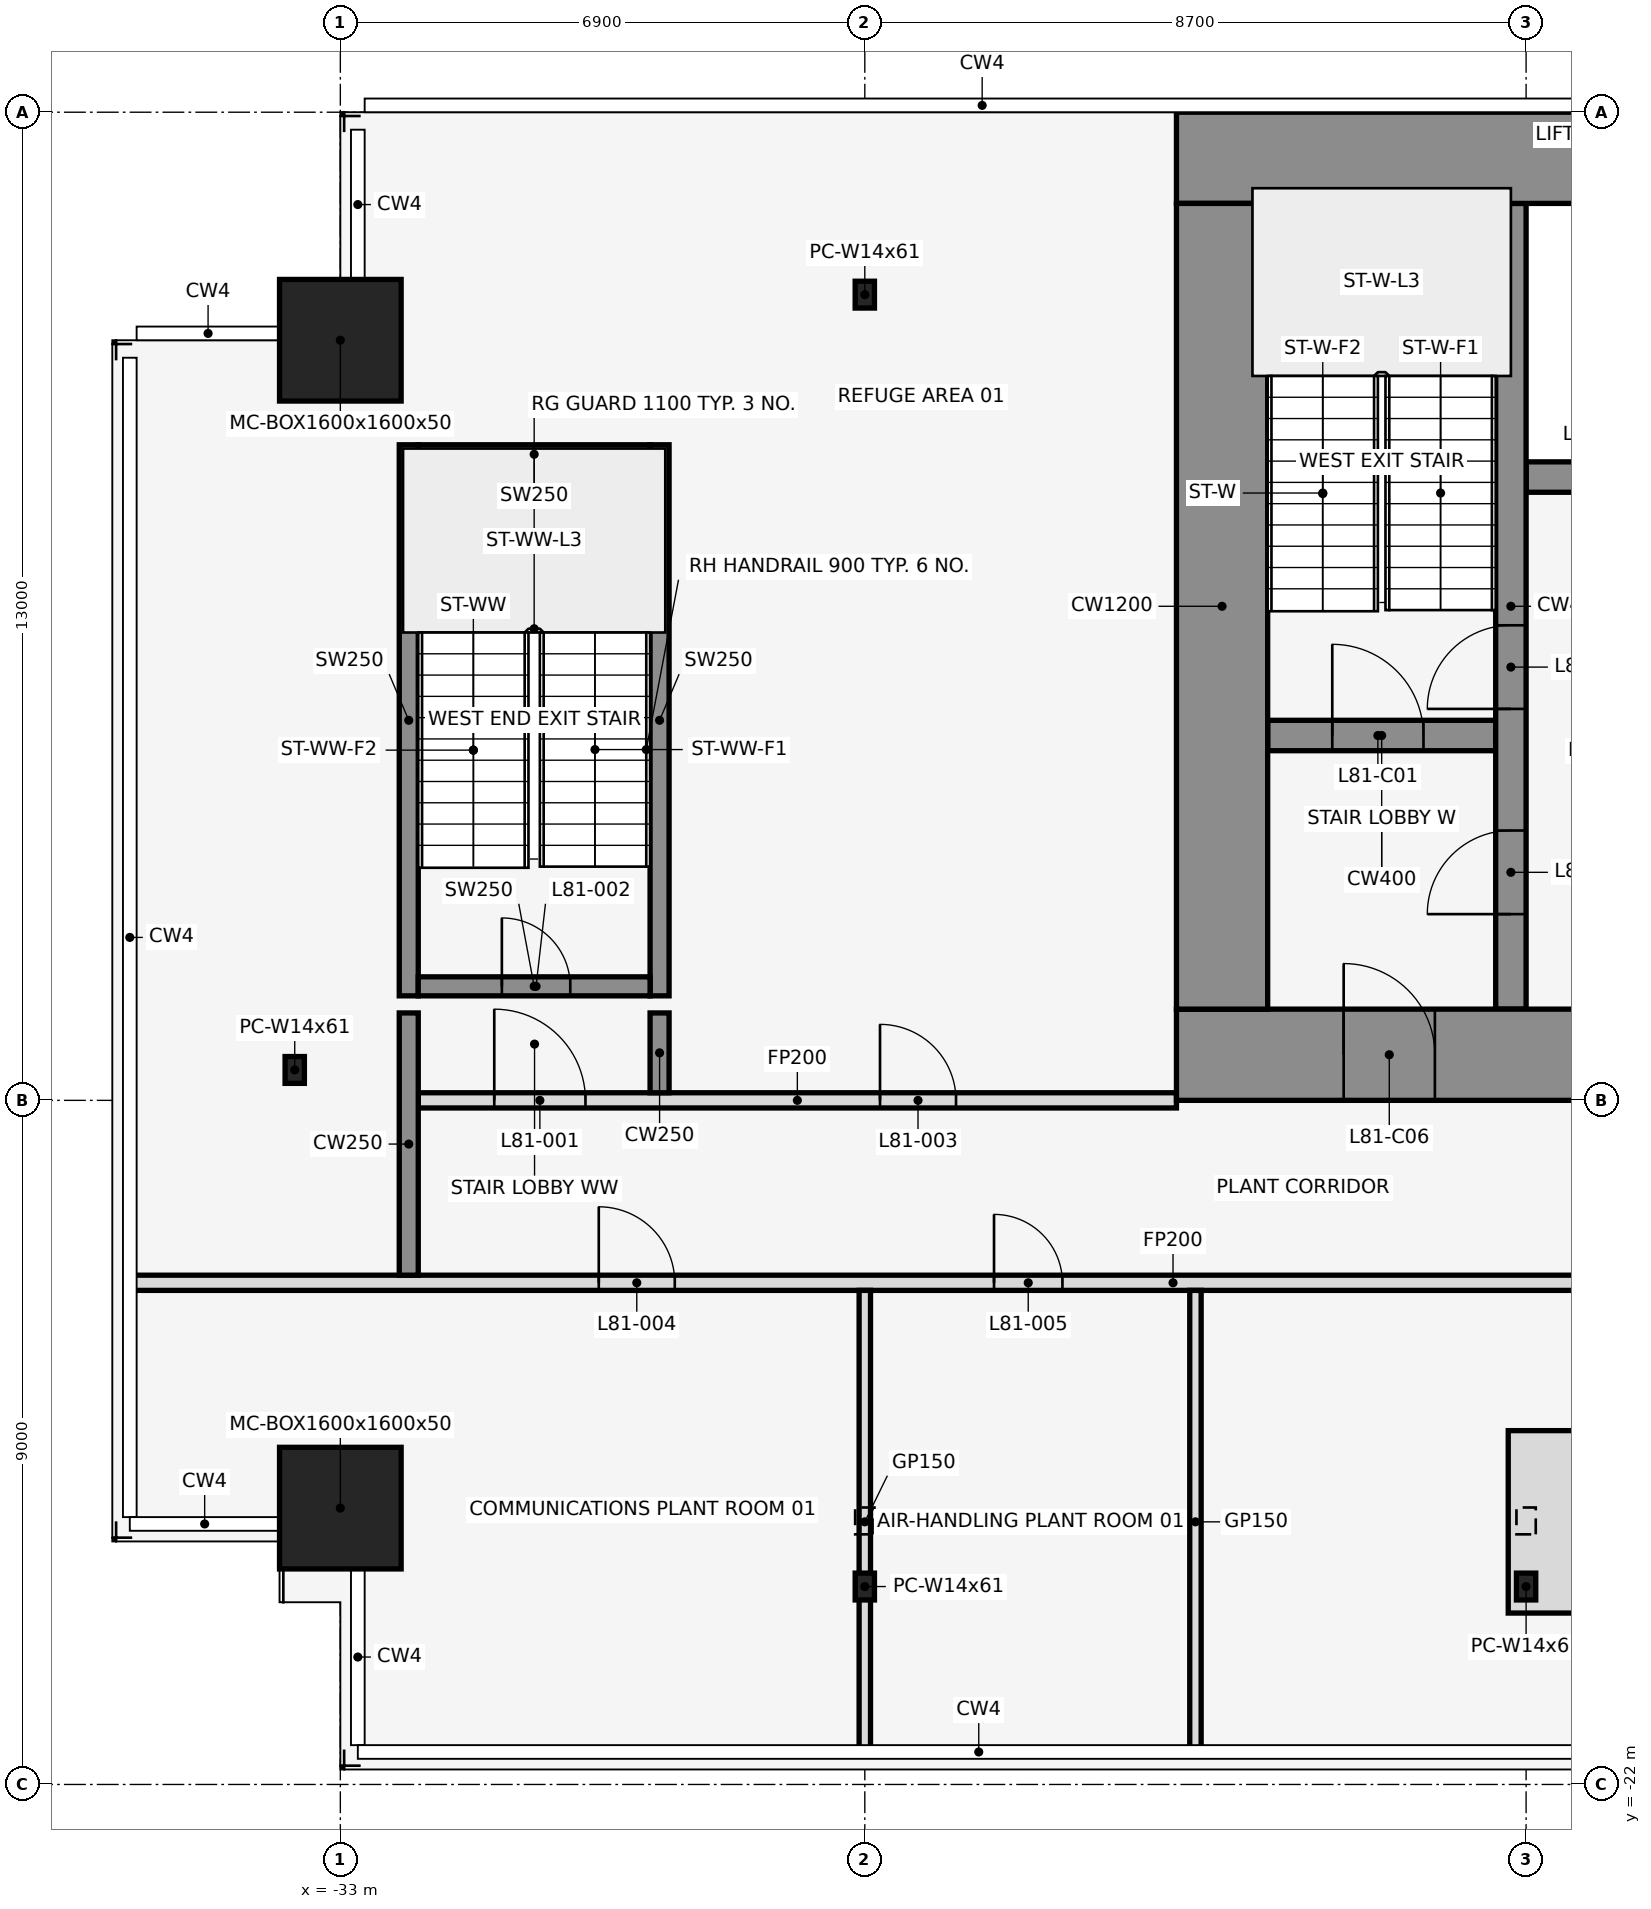
"""IFC4 building model, lengths in metres.
Left out: names, types, materials, properties, quantities, classifications, styles, units other than length and angle.
Written with IfcOpenShell. Run it as: python <this file> out.ifc"""

import sys

from ifc_helpers import new_model, si_unit, direction, frame, frame_2d, origin, origin_2d, place, context, subcontext, project, spatial, rectangle, hollow_rectangle, i_section, extrude, element, fill, save


model = new_model("IFC4")
c1 = context("Model", 3, precision=1e-05, world=origin(), true_north=direction((0.0, 1.0)))
c2 = subcontext(c1, "Body", "Model", "MODEL_VIEW")
j1 = project(units=[si_unit("LENGTHUNIT", "METRE"), si_unit("PLANEANGLEUNIT", "RADIAN")], contexts=[c1])
p1 = place(None, origin())
s1 = spatial("IfcSite", under=j1, at=p1, CompositionType="ELEMENT")
p2 = place(p1, origin())
s2 = spatial("IfcBuilding", under=s1, at=p2, CompositionType="ELEMENT")
p3 = place(p2, frame((0.0, 0.0, 361.4)))
s3 = spatial("IfcBuildingStorey", under=s2, at=p3, CompositionType="ELEMENT", Elevation=361.4)
for number, where, z_axis, x_axis in (
    (1, (-33.0, -18.365, 0.0), (0.0, 0.0, 1.0), (1.0, 0.0, 0.0)),
    (2, (-33.0, -3.0, 0.0), (0.0, 0.0, 1.0), (1.0, 0.0, 0.0)),
):
    element("IfcColumn", number, at=place(p3, frame(where, z_axis=z_axis, x_axis=x_axis)), inside=s3, PredefinedType="COLUMN", context=c2, shape_type="SweptSolid", body=[
        extrude(hollow_rectangle(XDim=1.6, YDim=1.6, WallThickness=0.05, at=origin_2d()), origin(), (0.0, 0.0, 1.0), 4.5),
    ])
p4 = place(p3, frame((-26.1, -19.396, 0.034), z_axis=(0.0, 0.191206783257, 0.981549777666), x_axis=(-1.0, 0.0, 0.0)))
e3 = element("IfcColumn", 3, at=p4, inside=s3, PredefinedType="COLUMN", context=c2, shape_type="SweptSolid", body=[
    extrude(i_section(OverallWidth=0.254, OverallDepth=0.353, WebThickness=0.01, FlangeThickness=0.016, at=origin_2d()), origin(), (0.0, 0.0, 1.0), 4.516),
])
p5 = place(p3, frame((-26.1, -2.4, 0.0), z_axis=(0.0, 0.0, 1.0), x_axis=(1.0, 0.0, 0.0)))
e4 = element("IfcColumn", 4, at=p5, inside=s3, PredefinedType="COLUMN", context=c2, shape_type="SweptSolid", body=[
    extrude(i_section(OverallWidth=0.254, OverallDepth=0.353, WebThickness=0.01, FlangeThickness=0.016, at=origin_2d()), origin(), (0.0, 0.0, 1.0), 4.5),
])
p6 = place(p3, frame((-17.4, -19.396, 0.034), z_axis=(0.0, 0.191206783257, 0.981549777666), x_axis=(-1.0, 0.0, 0.0)))
e5 = element("IfcColumn", 5, at=p6, inside=s3, PredefinedType="COLUMN", context=c2, shape_type="SweptSolid", body=[
    extrude(i_section(OverallWidth=0.254, OverallDepth=0.353, WebThickness=0.01, FlangeThickness=0.016, at=origin_2d()), origin(), (0.0, 0.0, 1.0), 4.516),
])
p7 = place(p3, frame((-33.6, -12.6, 0.0), z_axis=(0.0, 0.0, 1.0), x_axis=(1.0, 0.0, 0.0)))
e6 = element("IfcColumn", 6, at=p7, inside=s3, PredefinedType="COLUMN", context=c2, shape_type="SweptSolid", body=[
    extrude(i_section(OverallWidth=0.254, OverallDepth=0.353, WebThickness=0.01, FlangeThickness=0.016, at=origin_2d()), origin(), (0.0, 0.0, 1.0), 4.5),
])
p8 = place(p3, frame((-15.185, -18.545, 0.0), z_axis=(0.0, 0.0, 1.0), x_axis=(1.0, 0.0, 0.0)))
e7 = element("IfcWall", 7, at=p8, inside=s3, PredefinedType="USERDEFINED", context=c2, shape_type="SweptSolid", body=[
    extrude(rectangle(XDim=4.9, YDim=2.4, at=origin_2d()), origin(), (0.0, 0.0, 1.0), 0.2),
])
for number, where, z_axis, x_axis in (
    (8, (-32.1, -11.625, 0.0), (0.0, 0.0, 1.0), (0.0, 1.0, 0.0)),
    (9, (-28.8, -11.625, 0.0), (0.0, 0.0, 1.0), (0.0, 1.0, 0.0)),
):
    element("IfcWall", number, at=place(p3, frame(where, z_axis=z_axis, x_axis=x_axis)), inside=s3, PredefinedType="SHEAR", context=c2, shape_type="SweptSolid", body=[
        extrude(rectangle(XDim=7.25, YDim=0.25, at=frame_2d((3.625, 0.0))), origin(), (0.0, 0.0, 1.0), 4.5),
    ])
p9 = place(p3, frame((-31.975, -11.5, 0.0), z_axis=(0.0, 0.0, 1.0), x_axis=(1.0, 0.0, 0.0)))
e10 = element("IfcWall", 10, at=p9, inside=s3, PredefinedType="SHEAR", context=c2, shape_type="SweptSolid", body=[
    extrude(rectangle(XDim=3.05, YDim=0.25, at=frame_2d((1.525, 0.0))), origin(), (0.0, 0.0, 1.0), 4.5),
])
p10 = place(p9, frame((1.1, 0.0, 0.0)))
e11 = element("IfcOpeningElement", 11, at=p10, cuts=e10, PredefinedType="OPENING", context=c2, shape_type="SweptSolid", body=[
    extrude(rectangle(XDim=0.9, YDim=2.1, at=frame_2d((0.45, 1.05))), frame((0.0, 0.137, 0.0), z_axis=(0.0, -1.0, 0.0), x_axis=(1.0, 0.0, 0.0)), (0.0, 0.0, 1.0), 0.274),
])
p11 = place(p3, frame((-31.975, -4.5, 0.0), z_axis=(0.0, 0.0, 1.0), x_axis=(1.0, 0.0, 0.0)))
e12 = element("IfcWall", 12, at=p11, inside=s3, PredefinedType="SHEAR", context=c2, shape_type="SweptSolid", body=[
    extrude(rectangle(XDim=3.05, YDim=0.25, at=frame_2d((1.525, 0.0))), origin(), (0.0, 0.0, 1.0), 4.5),
])
p12 = place(p3, frame((-35.79, -15.4, 0.0), z_axis=(0.0, 0.0, 1.0), x_axis=(1.0, 0.0, 0.0)))
e13 = element("IfcWall", 13, at=p12, inside=s3, PredefinedType="PARTITIONING", context=c2, shape_type="SweptSolid", body=[
    extrude(rectangle(XDim=27.49, YDim=0.2, at=frame_2d((13.745, 0.0))), origin(), (0.0, 0.0, 1.0), 3.368),
])
p13 = place(p12, frame((6.19, 0.0, 0.0)))
e14 = element("IfcOpeningElement", 14, at=p13, cuts=e13, PredefinedType="OPENING", context=c2, shape_type="SweptSolid", body=[
    extrude(rectangle(XDim=1.0, YDim=2.1, at=frame_2d((0.5, 1.05))), frame((0.0, 0.112, 0.0), z_axis=(0.0, -1.0, 0.0), x_axis=(1.0, 0.0, 0.0)), (0.0, 0.0, 1.0), 0.224),
])
p14 = place(p12, frame((11.39, 0.0, 0.0)))
e15 = element("IfcOpeningElement", 15, at=p14, cuts=e13, PredefinedType="OPENING", context=c2, shape_type="SweptSolid", body=[
    extrude(rectangle(XDim=0.9, YDim=2.1, at=frame_2d((0.45, 1.05))), frame((0.0, 0.112, 0.0), z_axis=(0.0, -1.0, 0.0), x_axis=(1.0, 0.0, 0.0)), (0.0, 0.0, 1.0), 0.224),
])
p15 = place(p12, frame((20.04, 0.0, 0.0)))
e16 = element("IfcOpeningElement", 16, at=p15, cuts=e13, PredefinedType="OPENING", context=c2, shape_type="SweptSolid", body=[
    extrude(rectangle(XDim=1.0, YDim=2.1, at=frame_2d((0.5, 1.05))), frame((0.0, 0.112, 0.0), z_axis=(0.0, -1.0, 0.0), x_axis=(1.0, 0.0, 0.0)), (0.0, 0.0, 1.0), 0.224),
])
p16 = place(p3, frame((-31.975, -13.0, 0.0), z_axis=(0.0, 0.0, 1.0), x_axis=(1.0, 0.0, 0.0)))
e17 = element("IfcWall", 17, at=p16, inside=s3, PredefinedType="PARTITIONING", context=c2, shape_type="SweptSolid", body=[
    extrude(rectangle(XDim=9.975, YDim=0.2, at=frame_2d((4.988, 0.0))), origin(), (0.0, 0.0, 1.0), 3.368),
])
p17 = place(p16, frame((1.0, 0.0, 0.0)))
e18 = element("IfcOpeningElement", 18, at=p17, cuts=e17, PredefinedType="OPENING", context=c2, shape_type="SweptSolid", body=[
    extrude(rectangle(XDim=1.2, YDim=2.1, at=frame_2d((0.6, 1.05))), frame((0.0, 0.112, 0.0), z_axis=(0.0, -1.0, 0.0), x_axis=(1.0, 0.0, 0.0)), (0.0, 0.0, 1.0), 0.224),
])
p18 = place(p16, frame((6.075, 0.0, 0.0)))
e19 = element("IfcOpeningElement", 19, at=p18, cuts=e17, PredefinedType="OPENING", context=c2, shape_type="SweptSolid", body=[
    extrude(rectangle(XDim=1.0, YDim=2.1, at=frame_2d((0.5, 1.05))), frame((0.0, 0.112, 0.0), z_axis=(0.0, -1.0, 0.0), x_axis=(1.0, 0.0, 0.0)), (0.0, 0.0, 1.0), 0.224),
])
p19 = place(p3, frame((-32.1, -15.3, 0.0), z_axis=(0.0, 0.0, 1.0), x_axis=(0.0, 1.0, 0.0)))
e20 = element("IfcWall", 20, at=p19, inside=s3, PredefinedType="SHEAR", context=c2, shape_type="SweptSolid", body=[
    extrude(rectangle(XDim=3.45, YDim=0.25, at=frame_2d((1.725, 0.0))), origin(), (0.0, 0.0, 1.0), 4.5),
])
p20 = place(p3, frame((-28.8, -12.9, 0.0), z_axis=(0.0, 0.0, 1.0), x_axis=(0.0, 1.0, 0.0)))
e21 = element("IfcWall", 21, at=p20, inside=s3, PredefinedType="SHEAR", context=c2, shape_type="SweptSolid", body=[
    extrude(rectangle(XDim=1.05, YDim=0.25, at=frame_2d((0.525, 0.0))), origin(), (0.0, 0.0, 1.0), 4.5),
])
for number, where, z_axis, x_axis in (
    (22, (-26.1, -21.59, 0.0), (0.0, 0.0, 1.0), (0.0, 1.0, 0.0)),
    (23, (-21.75, -21.59, 0.0), (0.0, 0.0, 1.0), (0.0, 1.0, 0.0)),
):
    element("IfcWall", number, at=place(p3, frame(where, z_axis=z_axis, x_axis=x_axis)), inside=s3, PredefinedType="PARTITIONING", context=c2, shape_type="SweptSolid", body=[
        extrude(rectangle(XDim=6.09, YDim=0.15, at=frame_2d((3.045, 0.0))), origin(), (0.0, 0.0, 1.0), 3.368),
    ])
p21 = place(p3, frame((-20.8, -8.2, 0.0), z_axis=(0.0, 0.0, 1.0), x_axis=(1.0, 0.0, 0.0)))
e24 = element("IfcWall", 24, at=p21, inside=s3, PredefinedType="SHEAR", context=c2, shape_type="SweptSolid", body=[
    extrude(rectangle(XDim=3.0, YDim=0.4, at=frame_2d((1.5, 0.0))), origin(), (0.0, 0.0, 1.0), 4.5),
])
p22 = place(p21, frame((0.85, 0.0, 0.0)))
e25 = element("IfcOpeningElement", 25, at=p22, cuts=e24, PredefinedType="OPENING", context=c2, shape_type="SweptSolid", body=[
    extrude(rectangle(XDim=1.2, YDim=2.1, at=frame_2d((0.6, 1.05))), frame((0.0, 0.212, 0.0), z_axis=(0.0, -1.0, 0.0), x_axis=(1.0, 0.0, 0.0)), (0.0, 0.0, 1.0), 0.424),
])
p23 = place(p3, frame((-17.4, -4.8, 0.0), z_axis=(0.0, 0.0, 1.0), x_axis=(1.0, 0.0, 0.0)))
e26 = element("IfcWall", 26, at=p23, inside=s3, PredefinedType="SHEAR", context=c2, shape_type="SweptSolid", body=[
    extrude(rectangle(XDim=4.6, YDim=0.4, at=frame_2d((2.3, 0.0))), origin(), (0.0, 0.0, 1.0), 4.5),
])
p24 = place(p23, frame((0.65, 0.0, 0.0)))
e27 = element("IfcOpeningElement", 27, at=p24, cuts=e26, PredefinedType="OPENING", context=c2, shape_type="SweptSolid", body=[
    extrude(rectangle(XDim=1.1, YDim=2.1, at=frame_2d((0.55, 1.05))), frame((0.0, 0.212, 0.0), z_axis=(0.0, -1.0, 0.0), x_axis=(1.0, 0.0, 0.0)), (0.0, 0.0, 1.0), 0.424),
])
p25 = place(p23, frame((2.85, 0.0, 0.0)))
e28 = element("IfcOpeningElement", 28, at=p25, cuts=e26, PredefinedType="OPENING", context=c2, shape_type="SweptSolid", body=[
    extrude(rectangle(XDim=1.1, YDim=2.1, at=frame_2d((0.55, 1.05))), frame((0.0, 0.212, 0.0), z_axis=(0.0, -1.0, 0.0), x_axis=(1.0, 0.0, 0.0)), (0.0, 0.0, 1.0), 0.424),
])
p26 = place(p3, frame((-17.6, -11.8, 0.0), z_axis=(0.0, 0.0, 1.0), x_axis=(0.0, 1.0, 0.0)))
e29 = element("IfcWall", 29, at=p26, inside=s3, PredefinedType="SHEAR", context=c2, shape_type="SweptSolid", body=[
    extrude(rectangle(XDim=10.6, YDim=0.4, at=frame_2d((5.3, 0.0))), origin(), (0.0, 0.0, 1.0), 4.5),
])
p27 = place(p26, frame((1.25, 0.0, 0.0)))
e30 = element("IfcOpeningElement", 30, at=p27, cuts=e29, PredefinedType="OPENING", context=c2, shape_type="SweptSolid", body=[
    extrude(rectangle(XDim=1.1, YDim=2.1, at=frame_2d((0.55, 1.05))), frame((0.0, 0.212, 0.0), z_axis=(0.0, -1.0, 0.0), x_axis=(1.0, 0.0, 0.0)), (0.0, 0.0, 1.0), 0.424),
])
p28 = place(p26, frame((3.95, 0.0, 0.0)))
e31 = element("IfcOpeningElement", 31, at=p28, cuts=e29, PredefinedType="OPENING", context=c2, shape_type="SweptSolid", body=[
    extrude(rectangle(XDim=1.1, YDim=2.1, at=frame_2d((0.55, 1.05))), frame((0.0, 0.212, 0.0), z_axis=(0.0, -1.0, 0.0), x_axis=(1.0, 0.0, 0.0)), (0.0, 0.0, 1.0), 0.424),
])
p29 = place(p3, frame((-22.0, -0.6, 0.0), z_axis=(0.0, 0.0, 1.0), x_axis=(1.0, 0.0, 0.0)))
e32 = element("IfcWall", 32, at=p29, inside=s3, PredefinedType="SHEAR", context=c2, shape_type="SweptSolid", body=[
    extrude(rectangle(XDim=13.7, YDim=1.2, at=frame_2d((6.85, 0.0))), origin(), (0.0, 0.0, 1.0), 4.5),
])
p30 = place(p3, frame((-22.0, -12.4, 0.0), z_axis=(0.0, 0.0, 1.0), x_axis=(1.0, 0.0, 0.0)))
e33 = element("IfcWall", 33, at=p30, inside=s3, PredefinedType="SHEAR", context=c2, shape_type="SweptSolid", body=[
    extrude(rectangle(XDim=13.7, YDim=1.2, at=frame_2d((6.85, 0.0))), origin(), (0.0, 0.0, 1.0), 4.5),
])
p31 = place(p30, frame((2.2, 0.0, 0.0)))
e34 = element("IfcOpeningElement", 34, at=p31, cuts=e33, PredefinedType="OPENING", context=c2, shape_type="SweptSolid", body=[
    extrude(rectangle(XDim=1.2, YDim=2.1, at=frame_2d((0.6, 1.05))), frame((0.0, 0.612, 0.0), z_axis=(0.0, -1.0, 0.0), x_axis=(1.0, 0.0, 0.0)), (0.0, 0.0, 1.0), 1.224),
])
p32 = place(p30, frame((10.75, 0.0, 0.0)))
e35 = element("IfcOpeningElement", 35, at=p32, cuts=e33, PredefinedType="OPENING", context=c2, shape_type="SweptSolid", body=[
    extrude(rectangle(XDim=1.2, YDim=2.1, at=frame_2d((0.6, 1.05))), frame((0.0, 0.612, 0.0), z_axis=(0.0, -1.0, 0.0), x_axis=(1.0, 0.0, 0.0)), (0.0, 0.0, 1.0), 1.224),
])
p33 = place(p30, frame((6.3, 0.0, 0.0)))
e36 = element("IfcOpeningElement", 36, at=p33, cuts=e33, PredefinedType="OPENING", context=c2, shape_type="SweptSolid", body=[
    extrude(rectangle(XDim=1.2, YDim=2.1, at=frame_2d((0.6, 1.05))), frame((0.0, 0.612, 0.0), z_axis=(0.0, -1.0, 0.0), x_axis=(1.0, 0.0, 0.0)), (0.0, 0.0, 1.0), 1.224),
])
p34 = place(p3, frame((-21.4, -11.8, 0.0), z_axis=(0.0, 0.0, 1.0), x_axis=(0.0, 1.0, 0.0)))
e37 = element("IfcWall", 37, at=p34, inside=s3, PredefinedType="SHEAR", context=c2, shape_type="SweptSolid", body=[
    extrude(rectangle(XDim=10.6, YDim=1.2, at=frame_2d((5.3, 0.0))), origin(), (0.0, 0.0, 1.0), 4.5),
])
p35 = place(p17, origin())
e38 = element("IfcDoor", 38, at=p35, inside=s3, OperationType="SINGLE_SWING_LEFT", PredefinedType="DOOR", context=c2, shape_type="SweptSolid", body=[
    extrude(rectangle(XDim=1.2, YDim=2.1, at=frame_2d((0.6, 1.05))), frame((0.0, 0.025, 0.0), z_axis=(0.0, -1.0, 0.0), x_axis=(1.0, 0.0, 0.0)), (0.0, 0.0, 1.0), 0.05),
])
fill(e18, e38)
p36 = place(p10, origin())
e39 = element("IfcDoor", 39, at=p36, inside=s3, OperationType="SINGLE_SWING_LEFT", PredefinedType="DOOR", context=c2, shape_type="SweptSolid", body=[
    extrude(rectangle(XDim=0.9, YDim=2.1, at=frame_2d((0.45, 1.05))), frame((0.0, 0.025, 0.0), z_axis=(0.0, -1.0, 0.0), x_axis=(1.0, 0.0, 0.0)), (0.0, 0.0, 1.0), 0.05),
])
fill(e11, e39)
p37 = place(p18, origin())
e40 = element("IfcDoor", 40, at=p37, inside=s3, OperationType="SINGLE_SWING_RIGHT", PredefinedType="DOOR", context=c2, shape_type="SweptSolid", body=[
    extrude(rectangle(XDim=1.0, YDim=2.1, at=frame_2d((0.5, 1.05))), frame((0.0, 0.025, 0.0), z_axis=(0.0, -1.0, 0.0), x_axis=(1.0, 0.0, 0.0)), (0.0, 0.0, 1.0), 0.05),
])
fill(e19, e40)
p38 = place(p13, frame((1.0, 0.0, 0.0), z_axis=(0.0, 0.0, 1.0), x_axis=(-1.0, 0.0, 0.0)))
e41 = element("IfcDoor", 41, at=p38, inside=s3, OperationType="SINGLE_SWING_LEFT", PredefinedType="DOOR", context=c2, shape_type="SweptSolid", body=[
    extrude(rectangle(XDim=1.0, YDim=2.1, at=frame_2d((0.5, 1.05))), frame((0.0, 0.025, 0.0), z_axis=(0.0, -1.0, 0.0), x_axis=(1.0, 0.0, 0.0)), (0.0, 0.0, 1.0), 0.05),
])
fill(e14, e41)
p39 = place(p14, frame((0.9, 0.0, 0.0), z_axis=(0.0, 0.0, 1.0), x_axis=(-1.0, 0.0, 0.0)))
e42 = element("IfcDoor", 42, at=p39, inside=s3, OperationType="SINGLE_SWING_RIGHT", PredefinedType="DOOR", context=c2, shape_type="SweptSolid", body=[
    extrude(rectangle(XDim=0.9, YDim=2.1, at=frame_2d((0.45, 1.05))), frame((0.0, 0.025, 0.0), z_axis=(0.0, -1.0, 0.0), x_axis=(1.0, 0.0, 0.0)), (0.0, 0.0, 1.0), 0.05),
])
fill(e15, e42)
p40 = place(p22, origin())
e43 = element("IfcDoor", 43, at=p40, inside=s3, OperationType="SINGLE_SWING_LEFT", PredefinedType="DOOR", context=c2, shape_type="SweptSolid", body=[
    extrude(rectangle(XDim=1.2, YDim=2.1, at=frame_2d((0.6, 1.05))), frame((0.0, 0.025, 0.0), z_axis=(0.0, -1.0, 0.0), x_axis=(1.0, 0.0, 0.0)), (0.0, 0.0, 1.0), 0.05),
])
fill(e25, e43)
p41 = place(p27, frame((1.1, 0.0, 0.0), z_axis=(0.0, 0.0, 1.0), x_axis=(-1.0, 0.0, 0.0)))
e44 = element("IfcDoor", 44, at=p41, inside=s3, OperationType="SINGLE_SWING_LEFT", PredefinedType="DOOR", context=c2, shape_type="SweptSolid", body=[
    extrude(rectangle(XDim=1.1, YDim=2.1, at=frame_2d((0.55, 1.05))), frame((0.0, 0.025, 0.0), z_axis=(0.0, -1.0, 0.0), x_axis=(1.0, 0.0, 0.0)), (0.0, 0.0, 1.0), 0.05),
])
fill(e30, e44)
p42 = place(p28, frame((1.1, 0.0, 0.0), z_axis=(0.0, 0.0, 1.0), x_axis=(-1.0, 0.0, 0.0)))
e45 = element("IfcDoor", 45, at=p42, inside=s3, OperationType="SINGLE_SWING_RIGHT", PredefinedType="DOOR", context=c2, shape_type="SweptSolid", body=[
    extrude(rectangle(XDim=1.1, YDim=2.1, at=frame_2d((0.55, 1.05))), frame((0.0, 0.025, 0.0), z_axis=(0.0, -1.0, 0.0), x_axis=(1.0, 0.0, 0.0)), (0.0, 0.0, 1.0), 0.05),
])
fill(e31, e45)
p43 = place(p31, frame((1.2, 0.0, 0.0), z_axis=(0.0, 0.0, 1.0), x_axis=(-1.0, 0.0, 0.0)))
e46 = element("IfcDoor", 46, at=p43, inside=s3, OperationType="SINGLE_SWING_RIGHT", PredefinedType="DOOR", context=c2, shape_type="SweptSolid", body=[
    extrude(rectangle(XDim=1.2, YDim=2.1, at=frame_2d((0.6, 1.05))), frame((0.0, 0.025, 0.0), z_axis=(0.0, -1.0, 0.0), x_axis=(1.0, 0.0, 0.0)), (0.0, 0.0, 1.0), 0.05),
])
fill(e34, e46)
save(model, sys.argv[1])
